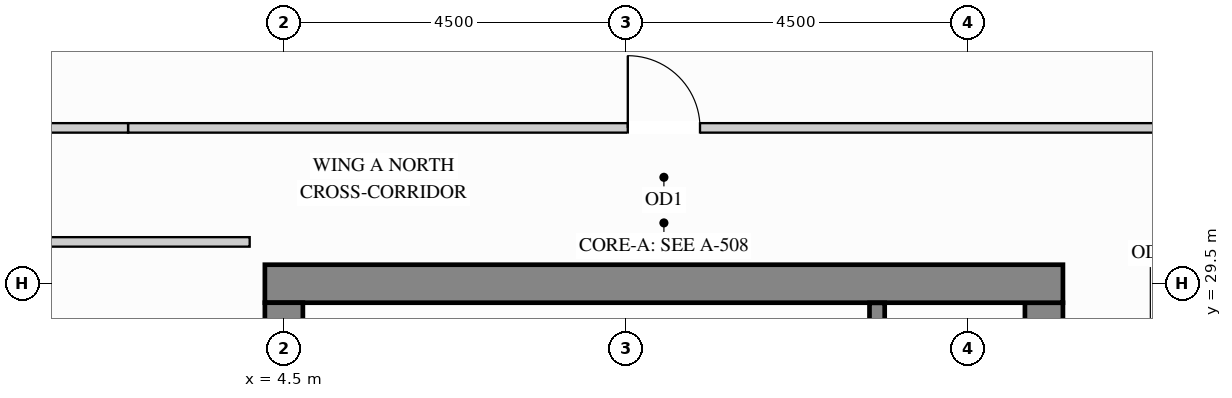
"""IFC4 building model, lengths in metres.
Left out: names, types, materials, properties, quantities, classifications, styles, units other than length and angle.
Written with IfcOpenShell. Run it as: python <this file> out.ifc"""

import sys

from ifc_helpers import new_model, si_unit, direction, frame, frame_2d, origin, place, context, subcontext, project, spatial, rectangle, extrude, source, transform, mapped, element, fill, save


model = new_model("IFC4")
c1 = context("Model", 3, precision=1e-05, world=origin(), true_north=direction((0.0, 1.0)))
c2 = subcontext(c1, "Body", "Model", "MODEL_VIEW")
j1 = project(units=[si_unit("LENGTHUNIT", "METRE"), si_unit("PLANEANGLEUNIT", "RADIAN")], contexts=[c1])
p1 = place(None, origin())
s1 = spatial("IfcSite", under=j1, at=p1, CompositionType="ELEMENT")
p2 = place(p1, origin())
s2 = spatial("IfcBuilding", under=s1, at=p2, CompositionType="ELEMENT")
p3 = place(p2, frame((0.0, 0.0, 212.4)))
s3 = spatial("IfcBuildingStorey", under=s2, at=p3, CompositionType="ELEMENT", Elevation=212.4)
m1 = source(origin(), c2, "Body", "SweptSolid", [
    extrude(rectangle(XDim=8.37, YDim=0.5, at=frame_2d((4.185, 0.0))), origin(), (0.0, 0.0, 1.0), 3.4),
])
p4 = place(p3, frame((14.5, 20.88, 0.0), z_axis=(0.0, 0.0, 1.0), x_axis=(0.0, 1.0, 0.0)))
e1 = element("IfcWall", 1, at=p4, inside=s3, PredefinedType="SHEAR", context=c2, shape_type="MappedRepresentation", body=[
    mapped(m1, transform((0.0, 0.0, 0.0), x_axis=(1.0, 0.0, 0.0), y_axis=(0.0, 1.0, 0.0), z_axis=(0.0, 0.0, 1.0))),
])
m2 = source(origin(), c2, "Body", "SweptSolid", [
    extrude(rectangle(XDim=10.5, YDim=0.5, at=frame_2d((5.25, 0.0))), origin(), (0.0, 0.0, 1.0), 3.4),
])
p5 = place(p3, frame((4.25, 29.5, 0.0), z_axis=(0.0, 0.0, 1.0), x_axis=(1.0, 0.0, 0.0)))
e2 = element("IfcWall", 2, at=p5, inside=s3, PredefinedType="SHEAR", context=c2, shape_type="MappedRepresentation", body=[
    mapped(m2, transform((0.0, 0.0, 0.0), x_axis=(1.0, 0.0, 0.0), y_axis=(0.0, 1.0, 0.0), z_axis=(0.0, 0.0, 1.0))),
])
m3 = source(origin(), c2, "Body", "SweptSolid", [
    extrude(rectangle(XDim=20.5, YDim=0.5, at=frame_2d((10.25, 0.0))), origin(), (0.0, 0.0, 1.0), 3.4),
])
p6 = place(p3, frame((4.5, 8.75, 0.0), z_axis=(0.0, 0.0, 1.0), x_axis=(0.0, 1.0, 0.0)))
e3 = element("IfcWall", 3, at=p6, inside=s3, PredefinedType="SHEAR", context=c2, shape_type="MappedRepresentation", body=[
    mapped(m3, transform((0.0, 0.0, 0.0), x_axis=(1.0, 0.0, 0.0), y_axis=(0.0, 1.0, 0.0), z_axis=(0.0, 0.0, 1.0))),
])
p7 = place(p3, frame((2.45, 31.55, 0.0), z_axis=(0.0, 0.0, 1.0), x_axis=(1.0, 0.0, 0.0)))
e4 = element("IfcWall", 4, at=p7, inside=s3, PredefinedType="PARTITIONING", context=c2, shape_type="SweptSolid", body=[
    extrude(rectangle(XDim=14.1, YDim=0.125, at=frame_2d((7.05, 0.0))), origin(), (0.0, 0.0, 1.0), 3.385),
])
p8 = place(p7, frame((6.575, 0.0, 0.0)))
e5 = element("IfcOpeningElement", 5, at=p8, cuts=e4, PredefinedType="OPENING", context=c2, shape_type="SweptSolid", body=[
    extrude(rectangle(XDim=0.95, YDim=2.15, at=frame_2d((0.475, 1.075))), frame((0.0, 0.073, 0.0), z_axis=(0.0, -1.0, 0.0), x_axis=(1.0, 0.0, 0.0)), (0.0, 0.0, 1.0), 0.145),
])
m4 = source(origin(), c2, "Body", "SweptSolid", [
    extrude(rectangle(XDim=2.098, YDim=0.125, at=frame_2d((1.049, 0.0))), origin(), (0.0, 0.0, 1.0), 3.385),
])
p9 = place(p3, frame((0.352, 31.55, 0.0), z_axis=(0.0, 0.0, 1.0), x_axis=(1.0, 0.0, 0.0)))
e6 = element("IfcWall", 6, at=p9, inside=s3, PredefinedType="PARTITIONING", context=c2, shape_type="MappedRepresentation", body=[
    mapped(m4, transform((0.0, 0.0, 0.0), x_axis=(1.0, 0.0, 0.0), y_axis=(0.0, 1.0, 0.0), z_axis=(0.0, 0.0, 1.0))),
])
m5 = source(origin(), c2, "Body", "SweptSolid", [
    extrude(rectangle(XDim=3.0, YDim=0.125, at=frame_2d((1.5, 0.0))), origin(), (0.0, 0.0, 1.0), 3.385),
])
p10 = place(p3, frame((1.05, 30.05, 0.0), z_axis=(0.0, 0.0, 1.0), x_axis=(1.0, 0.0, 0.0)))
e7 = element("IfcWall", 7, at=p10, inside=s3, PredefinedType="PARTITIONING", context=c2, shape_type="MappedRepresentation", body=[
    mapped(m5, transform((0.0, 0.0, 0.0), x_axis=(1.0, 0.0, 0.0), y_axis=(0.0, 1.0, 0.0), z_axis=(0.0, 0.0, 1.0))),
])
m6 = source(origin(), c2, "Body", "SweptSolid", [
    extrude(rectangle(XDim=3.803, YDim=0.2, at=frame_2d((1.901, 0.0))), origin(), (0.0, 0.0, 1.0), 3.4),
])
p11 = place(p3, frame((12.305, 25.445, 0.0), z_axis=(0.0, 0.0, 1.0), x_axis=(0.0, 1.0, 0.0)))
e8 = element("IfcWall", 8, at=p11, inside=s3, PredefinedType="SHEAR", context=c2, shape_type="MappedRepresentation", body=[
    mapped(m6, transform((0.0, 0.0, 0.0), x_axis=(1.0, 0.0, 0.0), y_axis=(0.0, 1.0, 0.0), z_axis=(0.0, 0.0, 1.0))),
])
m7 = source(origin(), c2, "Body", "SweptSolid", [
    extrude(rectangle(XDim=0.95, YDim=2.15, at=frame_2d((0.475, 1.075))), frame((0.0, 0.025, 0.0), z_axis=(0.0, -1.0, 0.0), x_axis=(1.0, 0.0, 0.0)), (0.0, 0.0, 1.0), 0.05),
])
p12 = place(p8, origin())
e9 = element("IfcDoor", 9, at=p12, inside=s3, OperationType="SINGLE_SWING_LEFT", PredefinedType="DOOR", context=c2, shape_type="MappedRepresentation", body=[
    mapped(m7, transform((0.0, 0.0, 0.0), x_axis=(1.0, 0.0, 0.0), y_axis=(0.0, 1.0, 0.0), z_axis=(0.0, 0.0, 1.0))),
])
fill(e5, e9)
save(model, sys.argv[1])
